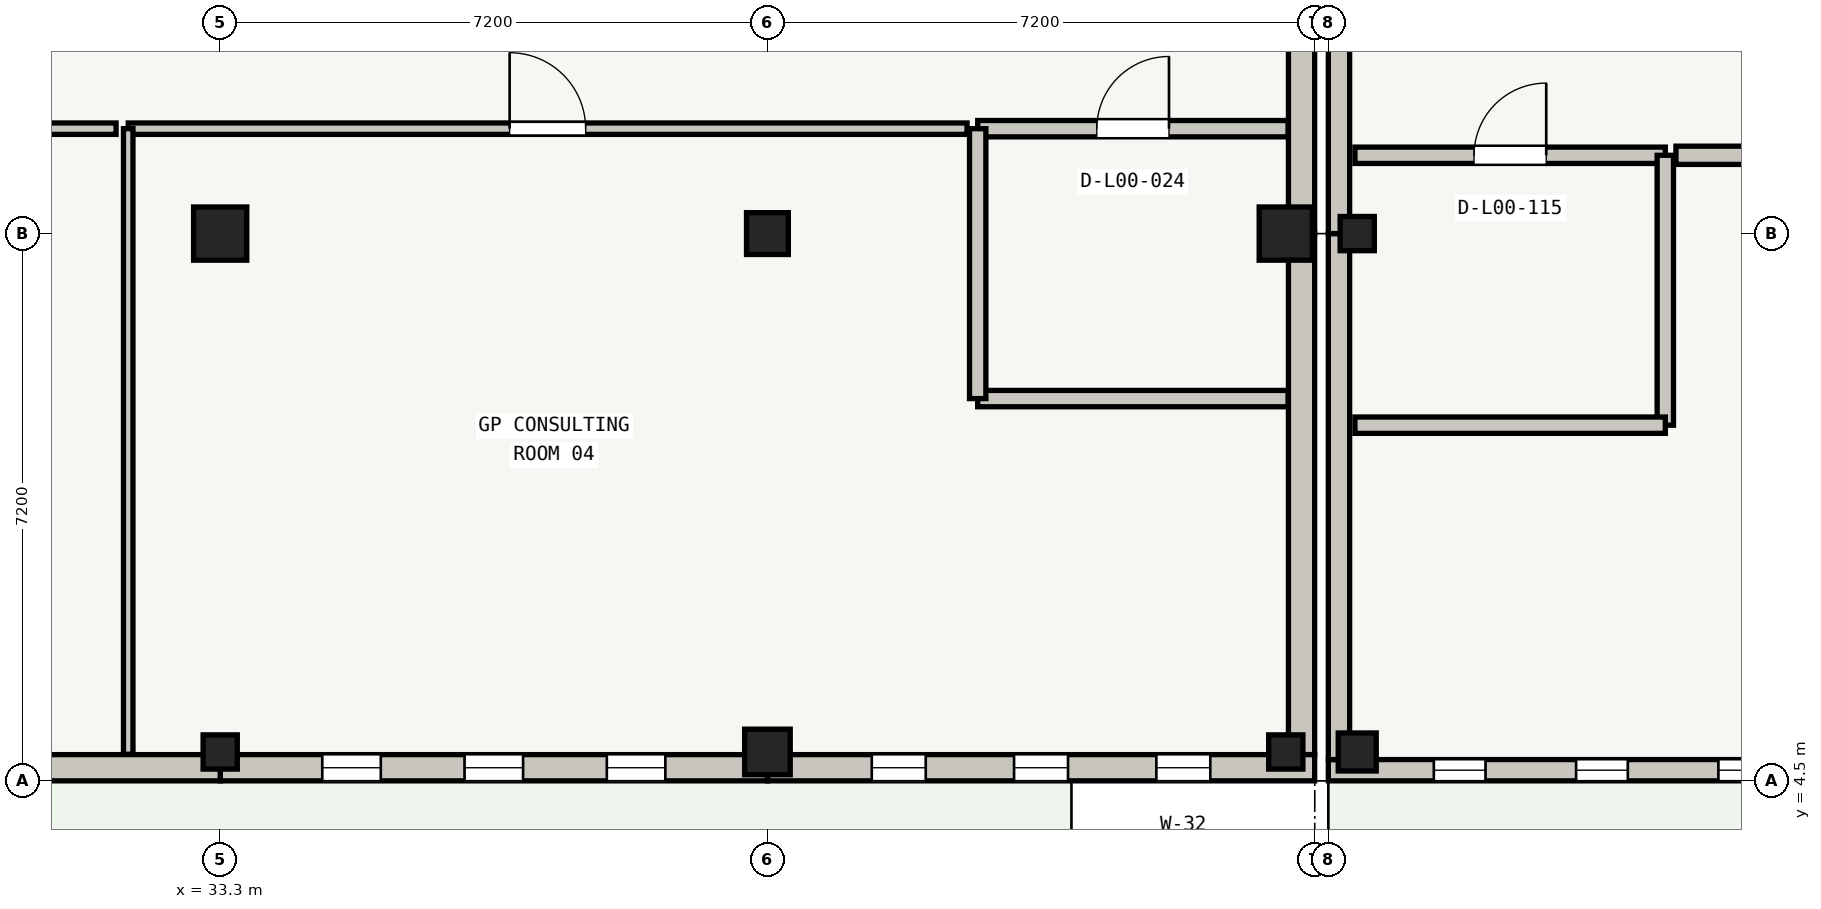
"""IFC4 building model, lengths in metres.
Left out: names, types, materials, properties, quantities, classifications, styles, units other than length and angle.
Written with IfcOpenShell. Run it as: python <this file> out.ifc"""

import sys

from ifc_helpers import new_model, si_unit, direction, frame, frame_2d, origin, origin_2d, place, context, subcontext, project, spatial, rectangle, extrude, element, fill, save


model = new_model("IFC4")
c1 = context("Model", 3, precision=1e-05, world=origin(), true_north=direction((0.0, 1.0)))
c2 = subcontext(c1, "Body", "Model", "MODEL_VIEW")
j1 = project(units=[si_unit("LENGTHUNIT", "METRE"), si_unit("PLANEANGLEUNIT", "RADIAN")], contexts=[c1])
p1 = place(None, origin())
s1 = spatial("IfcSite", under=j1, at=p1, CompositionType="ELEMENT")
p2 = place(p1, origin())
s2 = spatial("IfcBuilding", under=s1, at=p2, CompositionType="ELEMENT")
p3 = place(p2, origin())
s3 = spatial("IfcBuildingStorey", under=s2, at=p3, CompositionType="ELEMENT", Elevation=0.0)
p4 = place(p3, frame((33.3, 4.88, 0.0), z_axis=(0.0, 0.0, 1.0), x_axis=(1.0, 0.0, 0.0)))
e1 = element("IfcColumn", 1, at=p4, inside=s3, PredefinedType="COLUMN", context=c2, shape_type="SweptSolid", body=[
    extrude(rectangle(XDim=0.45, YDim=0.45, at=origin_2d()), origin(), (0.0, 0.0, 1.0), 4.22),
])
p5 = place(p3, frame((33.3, 11.7, 0.0), z_axis=(0.0, 0.0, 1.0), x_axis=(1.0, 0.0, 0.0)))
e2 = element("IfcColumn", 2, at=p5, inside=s3, PredefinedType="COLUMN", context=c2, shape_type="SweptSolid", body=[
    extrude(rectangle(XDim=0.7, YDim=0.7, at=origin_2d()), origin(), (0.0, 0.0, 1.0), 4.22),
])
p6 = place(p3, frame((40.5, 4.88, 0.0), z_axis=(0.0, 0.0, 1.0), x_axis=(1.0, 0.0, 0.0)))
e3 = element("IfcColumn", 3, at=p6, inside=s3, PredefinedType="COLUMN", context=c2, shape_type="SweptSolid", body=[
    extrude(rectangle(XDim=0.6, YDim=0.6, at=origin_2d()), origin(), (0.0, 0.0, 1.0), 4.22),
])
p7 = place(p3, frame((40.5, 11.7, 0.0), z_axis=(0.0, 0.0, 1.0), x_axis=(1.0, 0.0, 0.0)))
e4 = element("IfcColumn", 4, at=p7, inside=s3, PredefinedType="COLUMN", context=c2, shape_type="SweptSolid", body=[
    extrude(rectangle(XDim=0.55, YDim=0.55, at=origin_2d()), origin(), (0.0, 0.0, 1.0), 4.22),
])
p8 = place(p3, frame((47.32, 4.88, 0.0), z_axis=(0.0, 0.0, 1.0), x_axis=(1.0, 0.0, 0.0)))
e5 = element("IfcColumn", 5, at=p8, inside=s3, PredefinedType="COLUMN", context=c2, shape_type="SweptSolid", body=[
    extrude(rectangle(XDim=0.45, YDim=0.45, at=origin_2d()), origin(), (0.0, 0.0, 1.0), 4.22),
])
p9 = place(p3, frame((47.32, 11.7, 0.0), z_axis=(0.0, 0.0, 1.0), x_axis=(1.0, 0.0, 0.0)))
e6 = element("IfcColumn", 6, at=p9, inside=s3, PredefinedType="COLUMN", context=c2, shape_type="SweptSolid", body=[
    extrude(rectangle(XDim=0.7, YDim=0.7, at=origin_2d()), origin(), (0.0, 0.0, 1.0), 4.22),
])
p10 = place(p3, frame((48.26, 4.88, 0.0), z_axis=(0.0, 0.0, 1.0), x_axis=(1.0, 0.0, 0.0)))
e7 = element("IfcColumn", 7, at=p10, inside=s3, PredefinedType="COLUMN", context=c2, shape_type="SweptSolid", body=[
    extrude(rectangle(XDim=0.5, YDim=0.5, at=origin_2d()), origin(), (0.0, 0.0, 1.0), 4.185),
])
p11 = place(p3, frame((48.26, 11.7, 0.0), z_axis=(0.0, 0.0, 1.0), x_axis=(1.0, 0.0, 0.0)))
e8 = element("IfcColumn", 8, at=p11, inside=s3, PredefinedType="COLUMN", context=c2, shape_type="SweptSolid", body=[
    extrude(rectangle(XDim=0.45, YDim=0.45, at=origin_2d()), origin(), (0.0, 0.0, 1.0), 4.185),
])
for number, where, z_axis, x_axis in (
    (9, (47.528, 18.555, 0.0), (0.0, 0.0, 1.0), (0.0, -1.0, 0.0)),
    (10, (47.528, 11.7, 0.0), (0.0, 0.0, 1.0), (0.0, -1.0, 0.0)),
):
    element("IfcWall", number, at=place(p3, frame(where, z_axis=z_axis, x_axis=x_axis)), inside=s3, PredefinedType="SOLIDWALL", context=c2, shape_type="SweptSolid", body=[
        extrude(rectangle(XDim=6.855, YDim=0.345, at=frame_2d((3.427, 0.0))), origin(), (0.0, 0.0, 1.0), 3.605),
    ])
p12 = place(p3, frame((47.7, 4.673, 0.0), z_axis=(0.0, 0.0, 1.0), x_axis=(-1.0, 0.0, 0.0)))
e11 = element("IfcWall", 11, at=p12, inside=s3, PredefinedType="SOLIDWALL", context=c2, shape_type="SweptSolid", body=[
    extrude(rectangle(XDim=7.2, YDim=0.345, at=frame_2d((3.6, 0.0))), origin(), (0.0, 0.0, 1.0), 3.405),
])
p13 = place(p12, frame((1.373, 0.0, 0.55)))
e12 = element("IfcOpeningElement", 12, at=p13, cuts=e11, PredefinedType="OPENING", context=c2, shape_type="SweptSolid", body=[
    extrude(rectangle(XDim=0.71, YDim=2.14, at=frame_2d((0.355, 1.07))), frame((0.0, 0.172, 0.0), z_axis=(0.0, -1.0, 0.0), x_axis=(1.0, 0.0, 0.0)), (0.0, 0.0, 1.0), 0.345),
])
p14 = place(p12, frame((3.245, 0.0, 0.55)))
e13 = element("IfcOpeningElement", 13, at=p14, cuts=e11, PredefinedType="OPENING", context=c2, shape_type="SweptSolid", body=[
    extrude(rectangle(XDim=0.71, YDim=2.14, at=frame_2d((0.355, 1.07))), frame((0.0, 0.172, 0.0), z_axis=(0.0, -1.0, 0.0), x_axis=(1.0, 0.0, 0.0)), (0.0, 0.0, 1.0), 0.345),
])
p15 = place(p12, frame((5.117, 0.0, 0.55)))
e14 = element("IfcOpeningElement", 14, at=p15, cuts=e11, PredefinedType="OPENING", context=c2, shape_type="SweptSolid", body=[
    extrude(rectangle(XDim=0.71, YDim=2.14, at=frame_2d((0.355, 1.07))), frame((0.0, 0.172, 0.0), z_axis=(0.0, -1.0, 0.0), x_axis=(1.0, 0.0, 0.0)), (0.0, 0.0, 1.0), 0.345),
])
p16 = place(p3, frame((40.5, 4.673, 0.0), z_axis=(0.0, 0.0, 1.0), x_axis=(-1.0, 0.0, 0.0)))
e15 = element("IfcWall", 15, at=p16, inside=s3, PredefinedType="SOLIDWALL", context=c2, shape_type="SweptSolid", body=[
    extrude(rectangle(XDim=7.2, YDim=0.345, at=frame_2d((3.6, 0.0))), origin(), (0.0, 0.0, 1.0), 3.405),
])
p17 = place(p16, frame((1.343, 0.0, 0.55)))
e16 = element("IfcOpeningElement", 16, at=p17, cuts=e15, PredefinedType="OPENING", context=c2, shape_type="SweptSolid", body=[
    extrude(rectangle(XDim=0.77, YDim=2.06, at=frame_2d((0.385, 1.03))), frame((0.0, 0.172, 0.0), z_axis=(0.0, -1.0, 0.0), x_axis=(1.0, 0.0, 0.0)), (0.0, 0.0, 1.0), 0.345),
])
p18 = place(p16, frame((3.215, 0.0, 0.55)))
e17 = element("IfcOpeningElement", 17, at=p18, cuts=e15, PredefinedType="OPENING", context=c2, shape_type="SweptSolid", body=[
    extrude(rectangle(XDim=0.77, YDim=2.06, at=frame_2d((0.385, 1.03))), frame((0.0, 0.172, 0.0), z_axis=(0.0, -1.0, 0.0), x_axis=(1.0, 0.0, 0.0)), (0.0, 0.0, 1.0), 0.345),
])
p19 = place(p16, frame((5.087, 0.0, 0.55)))
e18 = element("IfcOpeningElement", 18, at=p19, cuts=e15, PredefinedType="OPENING", context=c2, shape_type="SweptSolid", body=[
    extrude(rectangle(XDim=0.77, YDim=2.06, at=frame_2d((0.385, 1.03))), frame((0.0, 0.172, 0.0), z_axis=(0.0, -1.0, 0.0), x_axis=(1.0, 0.0, 0.0)), (0.0, 0.0, 1.0), 0.345),
])
p20 = place(p3, frame((33.3, 4.673, 0.0), z_axis=(0.0, 0.0, 1.0), x_axis=(-1.0, 0.0, 0.0)))
e19 = element("IfcWall", 19, at=p20, inside=s3, PredefinedType="SOLIDWALL", context=c2, shape_type="SweptSolid", body=[
    extrude(rectangle(XDim=7.2, YDim=0.345, at=frame_2d((3.6, 0.0))), origin(), (0.0, 0.0, 1.0), 3.555),
])
p21 = place(p20, frame((2.7, 0.0, 0.0)))
e20 = element("IfcOpeningElement", 20, at=p21, cuts=e19, PredefinedType="OPENING", context=c2, shape_type="SweptSolid", body=[
    extrude(rectangle(XDim=1.8, YDim=2.1, at=frame_2d((0.9, 1.05))), frame((0.0, 0.172, 0.0), z_axis=(0.0, -1.0, 0.0), x_axis=(1.0, 0.0, 0.0)), (0.0, 0.0, 1.0), 0.345),
])
p22 = place(p3, frame((55.08, 4.64, 0.0), z_axis=(0.0, 0.0, 1.0), x_axis=(-1.0, 0.0, 0.0)))
e21 = element("IfcWall", 21, at=p22, inside=s3, PredefinedType="STANDARD", context=c2, shape_type="SweptSolid", body=[
    extrude(rectangle(XDim=7.2, YDim=0.28, at=frame_2d((3.6, 0.0))), origin(), (0.0, 0.0, 1.0), 3.55),
])
p23 = place(p22, frame((1.388, 0.0, 0.55)))
e22 = element("IfcOpeningElement", 22, at=p23, cuts=e21, PredefinedType="OPENING", context=c2, shape_type="SweptSolid", body=[
    extrude(rectangle(XDim=0.68, YDim=2.22, at=frame_2d((0.34, 1.11))), frame((0.0, 0.14, 0.0), z_axis=(0.0, -1.0, 0.0), x_axis=(1.0, 0.0, 0.0)), (0.0, 0.0, 1.0), 0.28),
])
p24 = place(p22, frame((3.26, 0.0, 0.55)))
e23 = element("IfcOpeningElement", 23, at=p24, cuts=e21, PredefinedType="OPENING", context=c2, shape_type="SweptSolid", body=[
    extrude(rectangle(XDim=0.68, YDim=2.22, at=frame_2d((0.34, 1.11))), frame((0.0, 0.14, 0.0), z_axis=(0.0, -1.0, 0.0), x_axis=(1.0, 0.0, 0.0)), (0.0, 0.0, 1.0), 0.28),
])
p25 = place(p22, frame((5.132, 0.0, 0.55)))
e24 = element("IfcOpeningElement", 24, at=p25, cuts=e21, PredefinedType="OPENING", context=c2, shape_type="SweptSolid", body=[
    extrude(rectangle(XDim=0.68, YDim=2.22, at=frame_2d((0.34, 1.11))), frame((0.0, 0.14, 0.0), z_axis=(0.0, -1.0, 0.0), x_axis=(1.0, 0.0, 0.0)), (0.0, 0.0, 1.0), 0.28),
])
p26 = place(p3, frame((48.02, 4.78, 0.0), z_axis=(0.0, 0.0, 1.0), x_axis=(0.0, 1.0, 0.0)))
e25 = element("IfcWall", 25, at=p26, inside=s3, PredefinedType="STANDARD", context=c2, shape_type="SweptSolid", body=[
    extrude(rectangle(XDim=6.92, YDim=0.28, at=frame_2d((3.46, 0.0))), origin(), (0.0, 0.0, 1.0), 3.55),
])
p27 = place(p3, frame((48.02, 11.7, 0.0), z_axis=(0.0, 0.0, 1.0), x_axis=(0.0, 1.0, 0.0)))
e26 = element("IfcWall", 26, at=p27, inside=s3, PredefinedType="STANDARD", context=c2, shape_type="SweptSolid", body=[
    extrude(rectangle(XDim=6.92, YDim=0.28, at=frame_2d((3.46, 0.0))), origin(), (0.0, 0.0, 1.0), 3.55),
])
p28 = place(p3, frame((43.267, 13.08, 0.0), z_axis=(0.0, 0.0, 1.0), x_axis=(1.0, 0.0, 0.0)))
e27 = element("IfcWall", 27, at=p28, inside=s3, PredefinedType="PLUMBINGWALL", context=c2, shape_type="SweptSolid", body=[
    extrude(rectangle(XDim=4.083, YDim=0.215, at=frame_2d((2.042, 0.0))), origin(), (0.0, 0.0, 1.0), 3.24),
])
p29 = place(p28, frame((1.567, 0.0, 0.0)))
e28 = element("IfcOpeningElement", 28, at=p29, cuts=e27, PredefinedType="OPENING", context=c2, shape_type="SweptSolid", body=[
    extrude(rectangle(XDim=0.95, YDim=2.05, at=frame_2d((0.475, 1.025))), frame((0.0, 0.107, 0.0), z_axis=(0.0, -1.0, 0.0), x_axis=(1.0, 0.0, 0.0)), (0.0, 0.0, 1.0), 0.215),
])
p30 = place(p3, frame((47.35, 9.529, 0.0), z_axis=(0.0, 0.0, 1.0), x_axis=(-1.0, 0.0, 0.0)))
e29 = element("IfcWall", 29, at=p30, inside=s3, PredefinedType="PLUMBINGWALL", context=c2, shape_type="SweptSolid", body=[
    extrude(rectangle(XDim=4.083, YDim=0.215, at=frame_2d((2.042, 0.0))), origin(), (0.0, 0.0, 1.0), 3.24),
])
p31 = place(p3, frame((43.267, 9.529, 0.0), z_axis=(0.0, 0.0, 1.0), x_axis=(0.0, 1.0, 0.0)))
e30 = element("IfcWall", 30, at=p31, inside=s3, PredefinedType="PLUMBINGWALL", context=c2, shape_type="SweptSolid", body=[
    extrude(rectangle(XDim=3.551, YDim=0.215, at=frame_2d((1.775, 0.0))), origin(), (0.0, 0.0, 1.0), 3.24),
])
p32 = place(p3, frame((32.09, 13.08, 0.0), z_axis=(0.0, 0.0, 1.0), x_axis=(1.0, 0.0, 0.0)))
e31 = element("IfcWall", 31, at=p32, inside=s3, PredefinedType="PARTITIONING", context=c2, shape_type="SweptSolid", body=[
    extrude(rectangle(XDim=11.036, YDim=0.15, at=frame_2d((5.518, 0.0))), origin(), (0.0, 0.0, 1.0), 3.24),
])
p33 = place(p32, frame((5.018, 0.0, 0.0)))
e32 = element("IfcOpeningElement", 32, at=p33, cuts=e31, PredefinedType="OPENING", context=c2, shape_type="SweptSolid", body=[
    extrude(rectangle(XDim=1.0, YDim=2.05, at=frame_2d((0.5, 1.025))), frame((0.0, 0.075, 0.0), z_axis=(0.0, -1.0, 0.0), x_axis=(1.0, 0.0, 0.0)), (0.0, 0.0, 1.0), 0.15),
])
p34 = place(p3, frame((32.09, 4.85, 0.0), z_axis=(0.0, 0.0, 1.0), x_axis=(0.0, 1.0, 0.0)))
e33 = element("IfcWall", 33, at=p34, inside=s3, PredefinedType="PARTITIONING", context=c2, shape_type="SweptSolid", body=[
    extrude(rectangle(XDim=8.23, YDim=0.125, at=frame_2d((4.115, 0.0))), origin(), (0.0, 0.0, 1.0), 3.24),
])
p35 = place(p3, frame((16.67, 13.08, 0.0), z_axis=(0.0, 0.0, 1.0), x_axis=(1.0, 0.0, 0.0)))
e34 = element("IfcWall", 34, at=p35, inside=s3, PredefinedType="PARTITIONING", context=c2, shape_type="SweptSolid", body=[
    extrude(rectangle(XDim=15.26, YDim=0.15, at=frame_2d((7.63, 0.0))), origin(), (0.0, 0.0, 1.0), 3.24),
])
p36 = place(p35, frame((7.13, 0.0, 0.0)))
e35 = element("IfcOpeningElement", 35, at=p36, cuts=e34, PredefinedType="OPENING", context=c2, shape_type="SweptSolid", body=[
    extrude(rectangle(XDim=1.0, YDim=2.05, at=frame_2d((0.5, 1.025))), frame((0.0, 0.075, 0.0), z_axis=(0.0, -1.0, 0.0), x_axis=(1.0, 0.0, 0.0)), (0.0, 0.0, 1.0), 0.15),
])
p37 = place(p3, frame((48.23, 12.73, 0.0), z_axis=(0.0, 0.0, 1.0), x_axis=(1.0, 0.0, 0.0)))
e36 = element("IfcWall", 36, at=p37, inside=s3, PredefinedType="PLUMBINGWALL", context=c2, shape_type="SweptSolid", body=[
    extrude(rectangle(XDim=4.083, YDim=0.215, at=frame_2d((2.042, 0.0))), origin(), (0.0, 0.0, 1.0), 3.205),
])
p38 = place(p37, frame((1.567, 0.0, 0.0)))
e37 = element("IfcOpeningElement", 37, at=p38, cuts=e36, PredefinedType="OPENING", context=c2, shape_type="SweptSolid", body=[
    extrude(rectangle(XDim=0.95, YDim=2.05, at=frame_2d((0.475, 1.025))), frame((0.0, 0.107, 0.0), z_axis=(0.0, -1.0, 0.0), x_axis=(1.0, 0.0, 0.0)), (0.0, 0.0, 1.0), 0.215),
])
p39 = place(p3, frame((52.313, 12.73, 0.0), z_axis=(0.0, 0.0, 1.0), x_axis=(0.0, -1.0, 0.0)))
e38 = element("IfcWall", 38, at=p39, inside=s3, PredefinedType="PLUMBINGWALL", context=c2, shape_type="SweptSolid", body=[
    extrude(rectangle(XDim=3.551, YDim=0.215, at=frame_2d((1.775, 0.0))), origin(), (0.0, 0.0, 1.0), 3.205),
])
p40 = place(p3, frame((52.313, 9.179, 0.0), z_axis=(0.0, 0.0, 1.0), x_axis=(-1.0, 0.0, 0.0)))
e39 = element("IfcWall", 39, at=p40, inside=s3, PredefinedType="PLUMBINGWALL", context=c2, shape_type="SweptSolid", body=[
    extrude(rectangle(XDim=4.083, YDim=0.215, at=frame_2d((2.042, 0.0))), origin(), (0.0, 0.0, 1.0), 3.205),
])
p41 = place(p3, frame((52.454, 12.73, 0.0), z_axis=(0.0, 0.0, 1.0), x_axis=(1.0, 0.0, 0.0)))
e40 = element("IfcWall", 40, at=p41, inside=s3, PredefinedType="SOLIDWALL", context=c2, shape_type="SweptSolid", body=[
    extrude(rectangle(XDim=7.306, YDim=0.24, at=frame_2d((3.653, 0.0))), origin(), (0.0, 0.0, 1.0), 3.205),
])
p42 = place(p41, frame((3.872, 0.0, 0.0)))
e41 = element("IfcOpeningElement", 41, at=p42, cuts=e40, PredefinedType="OPENING", context=c2, shape_type="SweptSolid", body=[
    extrude(rectangle(XDim=1.35, YDim=2.1, at=frame_2d((0.675, 1.05))), frame((0.0, 0.12, 0.0), z_axis=(0.0, -1.0, 0.0), x_axis=(1.0, 0.0, 0.0)), (0.0, 0.0, 1.0), 0.24),
])
p43 = place(p13, origin())
e42 = element("IfcWindow", 42, at=p43, inside=s3, PartitioningType="SINGLE_PANEL", PredefinedType="WINDOW", context=c2, shape_type="SweptSolid", body=[
    extrude(rectangle(XDim=0.71, YDim=2.14, at=frame_2d((0.355, 1.07))), frame((0.0, 0.03, 0.0), z_axis=(0.0, -1.0, 0.0), x_axis=(1.0, 0.0, 0.0)), (0.0, 0.0, 1.0), 0.06),
])
fill(e12, e42)
p44 = place(p14, origin())
e43 = element("IfcWindow", 43, at=p44, inside=s3, PartitioningType="SINGLE_PANEL", PredefinedType="WINDOW", context=c2, shape_type="SweptSolid", body=[
    extrude(rectangle(XDim=0.71, YDim=2.14, at=frame_2d((0.355, 1.07))), frame((0.0, 0.03, 0.0), z_axis=(0.0, -1.0, 0.0), x_axis=(1.0, 0.0, 0.0)), (0.0, 0.0, 1.0), 0.06),
])
fill(e13, e43)
p45 = place(p15, origin())
e44 = element("IfcWindow", 44, at=p45, inside=s3, PartitioningType="SINGLE_PANEL", PredefinedType="WINDOW", context=c2, shape_type="SweptSolid", body=[
    extrude(rectangle(XDim=0.71, YDim=2.14, at=frame_2d((0.355, 1.07))), frame((0.0, 0.03, 0.0), z_axis=(0.0, -1.0, 0.0), x_axis=(1.0, 0.0, 0.0)), (0.0, 0.0, 1.0), 0.06),
])
fill(e14, e44)
p46 = place(p17, origin())
e45 = element("IfcWindow", 45, at=p46, inside=s3, PartitioningType="SINGLE_PANEL", PredefinedType="WINDOW", context=c2, shape_type="SweptSolid", body=[
    extrude(rectangle(XDim=0.77, YDim=2.06, at=frame_2d((0.385, 1.03))), frame((0.0, 0.03, 0.0), z_axis=(0.0, -1.0, 0.0), x_axis=(1.0, 0.0, 0.0)), (0.0, 0.0, 1.0), 0.06),
])
fill(e16, e45)
p47 = place(p18, origin())
e46 = element("IfcWindow", 46, at=p47, inside=s3, PartitioningType="SINGLE_PANEL", PredefinedType="WINDOW", context=c2, shape_type="SweptSolid", body=[
    extrude(rectangle(XDim=0.77, YDim=2.06, at=frame_2d((0.385, 1.03))), frame((0.0, 0.03, 0.0), z_axis=(0.0, -1.0, 0.0), x_axis=(1.0, 0.0, 0.0)), (0.0, 0.0, 1.0), 0.06),
])
fill(e17, e46)
p48 = place(p19, origin())
e47 = element("IfcWindow", 47, at=p48, inside=s3, PartitioningType="SINGLE_PANEL", PredefinedType="WINDOW", context=c2, shape_type="SweptSolid", body=[
    extrude(rectangle(XDim=0.77, YDim=2.06, at=frame_2d((0.385, 1.03))), frame((0.0, 0.03, 0.0), z_axis=(0.0, -1.0, 0.0), x_axis=(1.0, 0.0, 0.0)), (0.0, 0.0, 1.0), 0.06),
])
fill(e18, e47)
p49 = place(p23, origin())
e48 = element("IfcWindow", 48, at=p49, inside=s3, PartitioningType="SINGLE_PANEL", PredefinedType="WINDOW", context=c2, shape_type="SweptSolid", body=[
    extrude(rectangle(XDim=0.68, YDim=2.22, at=frame_2d((0.34, 1.11))), frame((0.0, 0.03, 0.0), z_axis=(0.0, -1.0, 0.0), x_axis=(1.0, 0.0, 0.0)), (0.0, 0.0, 1.0), 0.06),
])
fill(e22, e48)
p50 = place(p24, origin())
e49 = element("IfcWindow", 49, at=p50, inside=s3, PartitioningType="SINGLE_PANEL", PredefinedType="WINDOW", context=c2, shape_type="SweptSolid", body=[
    extrude(rectangle(XDim=0.68, YDim=2.22, at=frame_2d((0.34, 1.11))), frame((0.0, 0.03, 0.0), z_axis=(0.0, -1.0, 0.0), x_axis=(1.0, 0.0, 0.0)), (0.0, 0.0, 1.0), 0.06),
])
fill(e23, e49)
p51 = place(p25, origin())
e50 = element("IfcWindow", 50, at=p51, inside=s3, PartitioningType="SINGLE_PANEL", PredefinedType="WINDOW", context=c2, shape_type="SweptSolid", body=[
    extrude(rectangle(XDim=0.68, YDim=2.22, at=frame_2d((0.34, 1.11))), frame((0.0, 0.03, 0.0), z_axis=(0.0, -1.0, 0.0), x_axis=(1.0, 0.0, 0.0)), (0.0, 0.0, 1.0), 0.06),
])
fill(e24, e50)
p52 = place(p29, origin())
e51 = element("IfcDoor", 51, at=p52, inside=s3, OperationType="SINGLE_SWING_RIGHT", PredefinedType="DOOR", context=c2, shape_type="SweptSolid", body=[
    extrude(rectangle(XDim=0.95, YDim=2.05, at=frame_2d((0.475, 1.025))), frame((0.0, 0.025, 0.0), z_axis=(0.0, -1.0, 0.0), x_axis=(1.0, 0.0, 0.0)), (0.0, 0.0, 1.0), 0.05),
])
fill(e28, e51)
p53 = place(p33, origin())
e52 = element("IfcDoor", 52, at=p53, inside=s3, OperationType="SINGLE_SWING_LEFT", PredefinedType="DOOR", context=c2, shape_type="SweptSolid", body=[
    extrude(rectangle(XDim=1.0, YDim=2.05, at=frame_2d((0.5, 1.025))), frame((0.0, 0.025, 0.0), z_axis=(0.0, -1.0, 0.0), x_axis=(1.0, 0.0, 0.0)), (0.0, 0.0, 1.0), 0.05),
])
fill(e32, e52)
p54 = place(p38, origin())
e53 = element("IfcDoor", 53, at=p54, inside=s3, OperationType="SINGLE_SWING_RIGHT", PredefinedType="DOOR", context=c2, shape_type="SweptSolid", body=[
    extrude(rectangle(XDim=0.95, YDim=2.05, at=frame_2d((0.475, 1.025))), frame((0.0, 0.025, 0.0), z_axis=(0.0, -1.0, 0.0), x_axis=(1.0, 0.0, 0.0)), (0.0, 0.0, 1.0), 0.05),
])
fill(e37, e53)
save(model, sys.argv[1])
